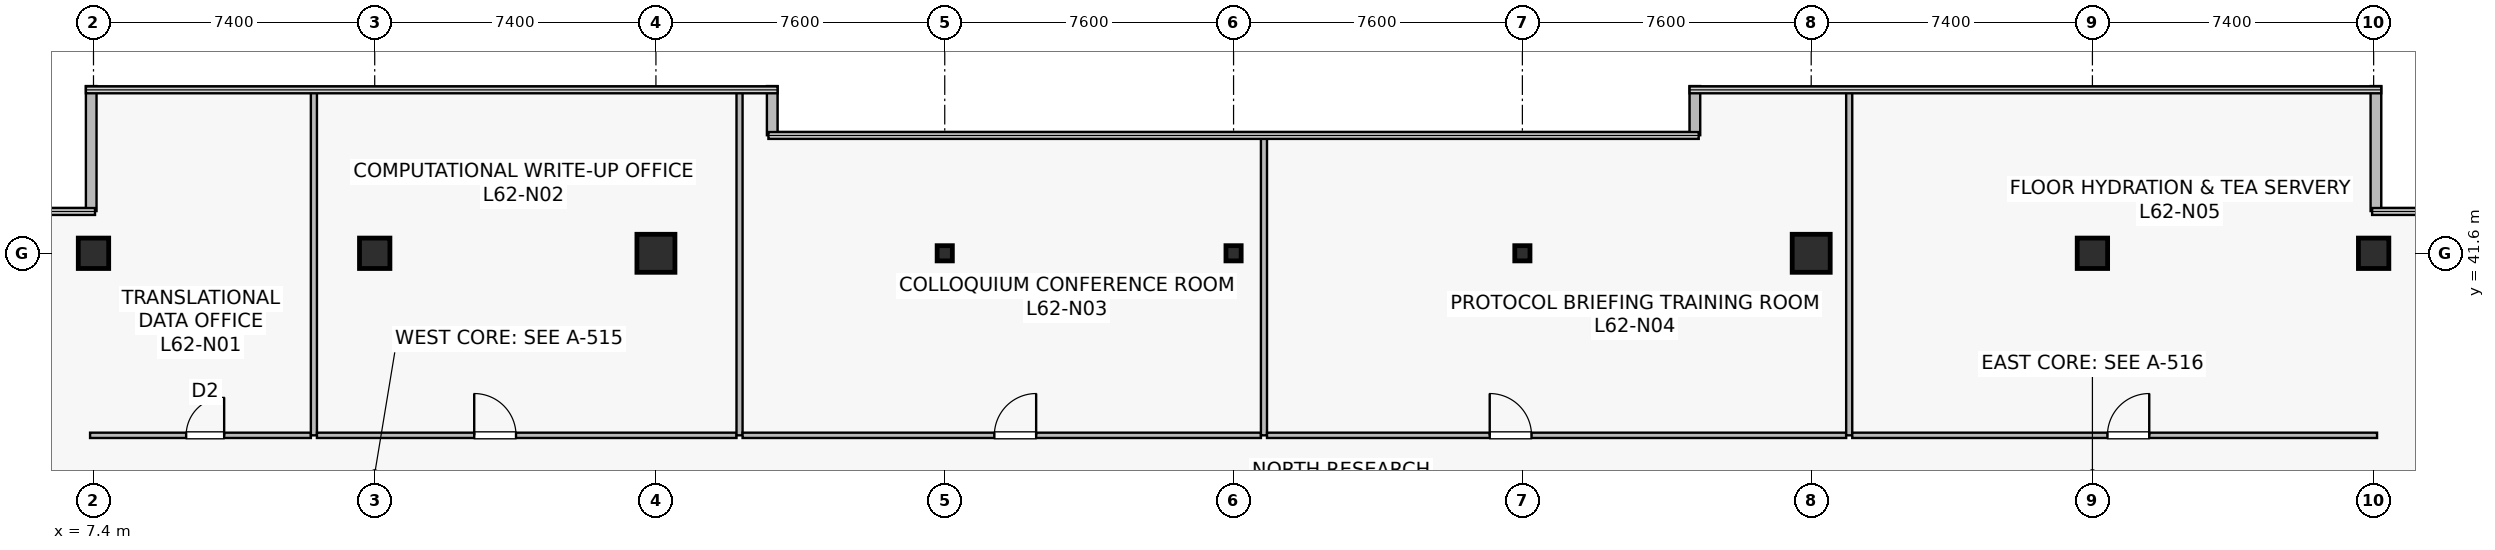
"""IFC4 building model, lengths in metres.
Left out: names, types, materials, properties, quantities, classifications, styles, units other than length and angle.
Written with IfcOpenShell. Run it as: python <this file> out.ifc"""

import sys

from ifc_helpers import new_model, si_unit, direction, frame, frame_2d, origin, origin_2d, place, context, subcontext, project, spatial, rectangle, hollow_rectangle, extrude, source, transform, mapped, element, fill, save


model = new_model("IFC4")
c1 = context("Model", 3, precision=1e-05, world=origin(), true_north=direction((0.0, 1.0)))
c2 = subcontext(c1, "Body", "Model", "MODEL_VIEW")
j1 = project(units=[si_unit("LENGTHUNIT", "METRE"), si_unit("PLANEANGLEUNIT", "RADIAN")], contexts=[c1])
p1 = place(None, origin())
s1 = spatial("IfcSite", under=j1, at=p1, CompositionType="ELEMENT")
p2 = place(p1, origin())
s2 = spatial("IfcBuilding", under=s1, at=p2, CompositionType="ELEMENT")
p3 = place(p2, frame((0.0, 0.0, 258.8)))
s3 = spatial("IfcBuildingStorey", under=s2, at=p3, CompositionType="ELEMENT", Elevation=258.8)
m1 = source(origin(), c2, "Body", "SweptSolid", [
    extrude(rectangle(XDim=0.8, YDim=0.8, at=origin_2d()), origin(), (0.0, 0.0, 1.0), 4.1),
])
p4 = place(p3, frame((14.8, 41.6, 0.0), z_axis=(0.0, 0.0, 1.0), x_axis=(1.0, 0.0, 0.0)))
e1 = element("IfcColumn", 1, at=p4, inside=s3, PredefinedType="COLUMN", context=c2, shape_type="MappedRepresentation", body=[
    mapped(m1, transform((0.0, 0.0, 0.0), scale=1.0)),
])
m2 = source(origin(), c2, "Body", "SweptSolid", [
    extrude(rectangle(XDim=1.0, YDim=1.0, at=origin_2d()), origin(), (0.0, 0.0, 1.0), 4.1),
])
for number, where, z_axis, x_axis in (
    (2, (22.2, 41.6, 0.0), (0.0, 0.0, 1.0), (1.0, 0.0, 0.0)),
    (3, (52.6, 41.6, 0.0), (0.0, 0.0, 1.0), (1.0, 0.0, 0.0)),
):
    element("IfcColumn", number, at=place(p3, frame(where, z_axis=z_axis, x_axis=x_axis)), inside=s3, PredefinedType="COLUMN", context=c2, shape_type="MappedRepresentation", body=[
        mapped(m2, transform((0.0, 0.0, 0.0), scale=1.0)),
    ])
for number, where, z_axis, x_axis in (
    (4, (60.0, 41.6, 0.0), (0.0, 0.0, 1.0), (1.0, 0.0, 0.0)),
    (5, (7.4, 41.6, 0.0), (0.0, 0.0, 1.0), (1.0, 0.0, 0.0)),
    (6, (67.4, 41.6, 0.0), (0.0, 0.0, 1.0), (1.0, 0.0, 0.0)),
):
    element("IfcColumn", number, at=place(p3, frame(where, z_axis=z_axis, x_axis=x_axis)), inside=s3, PredefinedType="COLUMN", context=c2, shape_type="MappedRepresentation", body=[
        mapped(m1, transform((0.0, 0.0, 0.0), scale=1.0)),
    ])
m3 = source(origin(), c2, "Body", "SweptSolid", [
    extrude(hollow_rectangle(XDim=0.4, YDim=0.4, WallThickness=0.019, at=origin_2d()), origin(), (0.0, 0.0, 1.0), 4.1),
])
for number, where, z_axis, x_axis in (
    (7, (29.8, 41.6, 0.0), (0.0, 0.0, 1.0), (1.0, 0.0, 0.0)),
    (8, (37.4, 41.6, 0.0), (0.0, 0.0, 1.0), (1.0, 0.0, 0.0)),
    (9, (45.0, 41.6, 0.0), (0.0, 0.0, 1.0), (1.0, 0.0, 0.0)),
):
    element("IfcColumn", number, at=place(p3, frame(where, z_axis=z_axis, x_axis=x_axis)), inside=s3, PredefinedType="COLUMN", context=c2, shape_type="MappedRepresentation", body=[
        mapped(m3, transform((0.0, 0.0, 0.0), scale=1.0)),
    ])
p5 = place(p3, frame((67.46, 42.712, 0.0), z_axis=(0.0, 0.0, 1.0), x_axis=(0.0, 1.0, 0.0)))
e10 = element("IfcWall", 10, at=p5, inside=s3, PredefinedType="STANDARD", context=c2, shape_type="SweptSolid", body=[
    extrude(rectangle(XDim=3.288, YDim=0.28, at=frame_2d((1.644, 0.0))), origin(), (0.0, 0.0, 1.0), 3.8),
])
for number, where, z_axis, x_axis in (
    (11, (49.54, 46.0, 0.0), (0.0, 0.0, 1.0), (0.0, -1.0, 0.0)),
    (12, (25.26, 44.707, 0.0), (0.0, 0.0, 1.0), (0.0, 1.0, 0.0)),
):
    element("IfcWall", number, at=place(p3, frame(where, z_axis=z_axis, x_axis=x_axis)), inside=s3, PredefinedType="STANDARD", context=c2, shape_type="SweptSolid", body=[
        extrude(rectangle(XDim=1.293, YDim=0.28, at=frame_2d((0.646, 0.0))), origin(), (0.0, 0.0, 1.0), 3.8),
    ])
p6 = place(p3, frame((7.34, 46.0, 0.0), z_axis=(0.0, 0.0, 1.0), x_axis=(0.0, -1.0, 0.0)))
e13 = element("IfcWall", 13, at=p6, inside=s3, PredefinedType="STANDARD", context=c2, shape_type="SweptSolid", body=[
    extrude(rectangle(XDim=3.288, YDim=0.28, at=frame_2d((1.644, 0.0))), origin(), (0.0, 0.0, 1.0), 3.8),
])
p7 = place(p3, frame((7.31, 36.81, 0.0), z_axis=(0.0, 0.0, 1.0), x_axis=(1.0, 0.0, 0.0)))
e14 = element("IfcWall", 14, at=p7, inside=s3, PredefinedType="PARTITIONING", context=c2, shape_type="SweptSolid", body=[
    extrude(rectangle(XDim=5.81, YDim=0.14, at=frame_2d((2.905, 0.0))), origin(), (0.0, 0.0, 1.0), 3.335),
])
p8 = place(p7, frame((2.528, 0.0, 0.0)))
e15 = element("IfcOpeningElement", 15, at=p8, cuts=e14, PredefinedType="OPENING", context=c2, shape_type="SweptSolid", body=[
    extrude(rectangle(XDim=1.0, YDim=2.15, at=frame_2d((0.5, 1.075))), frame((0.0, 0.08, 0.0), z_axis=(0.0, -1.0, 0.0), x_axis=(1.0, 0.0, 0.0)), (0.0, 0.0, 1.0), 0.16),
])
p9 = place(p3, frame((13.2, 36.81, 0.0), z_axis=(0.0, 0.0, 1.0), x_axis=(0.0, 1.0, 0.0)))
e16 = element("IfcWall", 16, at=p9, inside=s3, PredefinedType="PARTITIONING", context=c2, shape_type="SweptSolid", body=[
    extrude(rectangle(XDim=9.08, YDim=0.16, at=frame_2d((4.54, 0.0))), origin(), (0.0, 0.0, 1.0), 3.135),
])
p10 = place(p3, frame((13.28, 36.81, 0.0), z_axis=(0.0, 0.0, 1.0), x_axis=(1.0, 0.0, 0.0)))
e17 = element("IfcWall", 17, at=p10, inside=s3, PredefinedType="PARTITIONING", context=c2, shape_type="SweptSolid", body=[
    extrude(rectangle(XDim=11.04, YDim=0.14, at=frame_2d((5.52, 0.0))), origin(), (0.0, 0.0, 1.0), 3.197),
])
p11 = place(p10, frame((4.138, 0.0, 0.0)))
e18 = element("IfcOpeningElement", 18, at=p11, cuts=e17, PredefinedType="OPENING", context=c2, shape_type="SweptSolid", body=[
    extrude(rectangle(XDim=1.1, YDim=2.18, at=frame_2d((0.55, 1.09))), frame((0.0, 0.08, 0.0), z_axis=(0.0, -1.0, 0.0), x_axis=(1.0, 0.0, 0.0)), (0.0, 0.0, 1.0), 0.16),
])
p12 = place(p3, frame((24.4, 36.81, 0.0), z_axis=(0.0, 0.0, 1.0), x_axis=(0.0, 1.0, 0.0)))
e19 = element("IfcWall", 19, at=p12, inside=s3, PredefinedType="PARTITIONING", context=c2, shape_type="SweptSolid", body=[
    extrude(rectangle(XDim=9.08, YDim=0.16, at=frame_2d((4.54, 0.0))), origin(), (0.0, 0.0, 1.0), 3.135),
])
p13 = place(p3, frame((24.48, 36.81, 0.0), z_axis=(0.0, 0.0, 1.0), x_axis=(1.0, 0.0, 0.0)))
e20 = element("IfcWall", 20, at=p13, inside=s3, PredefinedType="PARTITIONING", context=c2, shape_type="SweptSolid", body=[
    extrude(rectangle(XDim=13.64, YDim=0.14, at=frame_2d((6.82, 0.0))), origin(), (0.0, 0.0, 1.0), 3.197),
])
p14 = place(p13, frame((6.625, 0.0, 0.0)))
e21 = element("IfcOpeningElement", 21, at=p14, cuts=e20, PredefinedType="OPENING", context=c2, shape_type="SweptSolid", body=[
    extrude(rectangle(XDim=1.1, YDim=2.18, at=frame_2d((0.55, 1.09))), frame((0.0, 0.08, 0.0), z_axis=(0.0, -1.0, 0.0), x_axis=(1.0, 0.0, 0.0)), (0.0, 0.0, 1.0), 0.16),
])
p15 = place(p3, frame((38.2, 36.81, 0.0), z_axis=(0.0, 0.0, 1.0), x_axis=(0.0, 1.0, 0.0)))
e22 = element("IfcWall", 22, at=p15, inside=s3, PredefinedType="PARTITIONING", context=c2, shape_type="SweptSolid", body=[
    extrude(rectangle(XDim=7.88, YDim=0.16, at=frame_2d((3.94, 0.0))), origin(), (0.0, 0.0, 1.0), 3.135),
])
p16 = place(p3, frame((38.28, 36.81, 0.0), z_axis=(0.0, 0.0, 1.0), x_axis=(1.0, 0.0, 0.0)))
e23 = element("IfcWall", 23, at=p16, inside=s3, PredefinedType="PARTITIONING", context=c2, shape_type="SweptSolid", body=[
    extrude(rectangle(XDim=15.24, YDim=0.14, at=frame_2d((7.62, 0.0))), origin(), (0.0, 0.0, 1.0), 3.197),
])
p17 = place(p16, frame((5.86, 0.0, 0.0)))
e24 = element("IfcOpeningElement", 24, at=p17, cuts=e23, PredefinedType="OPENING", context=c2, shape_type="SweptSolid", body=[
    extrude(rectangle(XDim=1.1, YDim=2.18, at=frame_2d((0.55, 1.09))), frame((0.0, 0.08, 0.0), z_axis=(0.0, -1.0, 0.0), x_axis=(1.0, 0.0, 0.0)), (0.0, 0.0, 1.0), 0.16),
])
p18 = place(p3, frame((53.6, 36.81, 0.0), z_axis=(0.0, 0.0, 1.0), x_axis=(0.0, 1.0, 0.0)))
e25 = element("IfcWall", 25, at=p18, inside=s3, PredefinedType="PARTITIONING", context=c2, shape_type="SweptSolid", body=[
    extrude(rectangle(XDim=9.08, YDim=0.16, at=frame_2d((4.54, 0.0))), origin(), (0.0, 0.0, 1.0), 3.135),
])
p19 = place(p3, frame((53.68, 36.81, 0.0), z_axis=(0.0, 0.0, 1.0), x_axis=(1.0, 0.0, 0.0)))
e26 = element("IfcWall", 26, at=p19, inside=s3, PredefinedType="PARTITIONING", context=c2, shape_type="SweptSolid", body=[
    extrude(rectangle(XDim=13.81, YDim=0.14, at=frame_2d((6.905, 0.0))), origin(), (0.0, 0.0, 1.0), 3.197),
])
p20 = place(p19, frame((6.715, 0.0, 0.0)))
e27 = element("IfcOpeningElement", 27, at=p20, cuts=e26, PredefinedType="OPENING", context=c2, shape_type="SweptSolid", body=[
    extrude(rectangle(XDim=1.1, YDim=2.18, at=frame_2d((0.55, 1.09))), frame((0.0, 0.08, 0.0), z_axis=(0.0, -1.0, 0.0), x_axis=(1.0, 0.0, 0.0)), (0.0, 0.0, 1.0), 0.16),
])
m4 = source(origin(), c2, "Body", "SweptSolid", [
    extrude(rectangle(XDim=1.0, YDim=2.15, at=frame_2d((0.5, 1.075))), frame((0.0, 0.025, 0.0), z_axis=(0.0, -1.0, 0.0), x_axis=(1.0, 0.0, 0.0)), (0.0, 0.0, 1.0), 0.05),
])
p21 = place(p8, origin())
e28 = element("IfcDoor", 28, at=p21, inside=s3, OperationType="SINGLE_SWING_RIGHT", PredefinedType="DOOR", context=c2, shape_type="MappedRepresentation", body=[
    mapped(m4, transform((0.0, 0.0, 0.0), scale=1.0)),
])
fill(e15, e28)
m5 = source(origin(), c2, "Body", "SweptSolid", [
    extrude(rectangle(XDim=1.1, YDim=2.18, at=frame_2d((0.55, 1.09))), frame((0.0, 0.025, 0.0), z_axis=(0.0, -1.0, 0.0), x_axis=(1.0, 0.0, 0.0)), (0.0, 0.0, 1.0), 0.05),
])
p22 = place(p11, origin())
e29 = element("IfcDoor", 29, at=p22, inside=s3, OperationType="SINGLE_SWING_LEFT", PredefinedType="DOOR", context=c2, shape_type="MappedRepresentation", body=[
    mapped(m5, transform((0.0, 0.0, 0.0), scale=1.0)),
])
fill(e18, e29)
p23 = place(p14, origin())
e30 = element("IfcDoor", 30, at=p23, inside=s3, OperationType="SINGLE_SWING_RIGHT", PredefinedType="DOOR", context=c2, shape_type="MappedRepresentation", body=[
    mapped(m5, transform((0.0, 0.0, 0.0), scale=1.0)),
])
fill(e21, e30)
p24 = place(p17, origin())
e31 = element("IfcDoor", 31, at=p24, inside=s3, OperationType="SINGLE_SWING_LEFT", PredefinedType="DOOR", context=c2, shape_type="MappedRepresentation", body=[
    mapped(m5, transform((0.0, 0.0, 0.0), scale=1.0)),
])
fill(e24, e31)
p25 = place(p20, origin())
e32 = element("IfcDoor", 32, at=p25, inside=s3, OperationType="SINGLE_SWING_RIGHT", PredefinedType="DOOR", context=c2, shape_type="MappedRepresentation", body=[
    mapped(m5, transform((0.0, 0.0, 0.0), scale=1.0)),
])
fill(e27, e32)
save(model, sys.argv[1])
